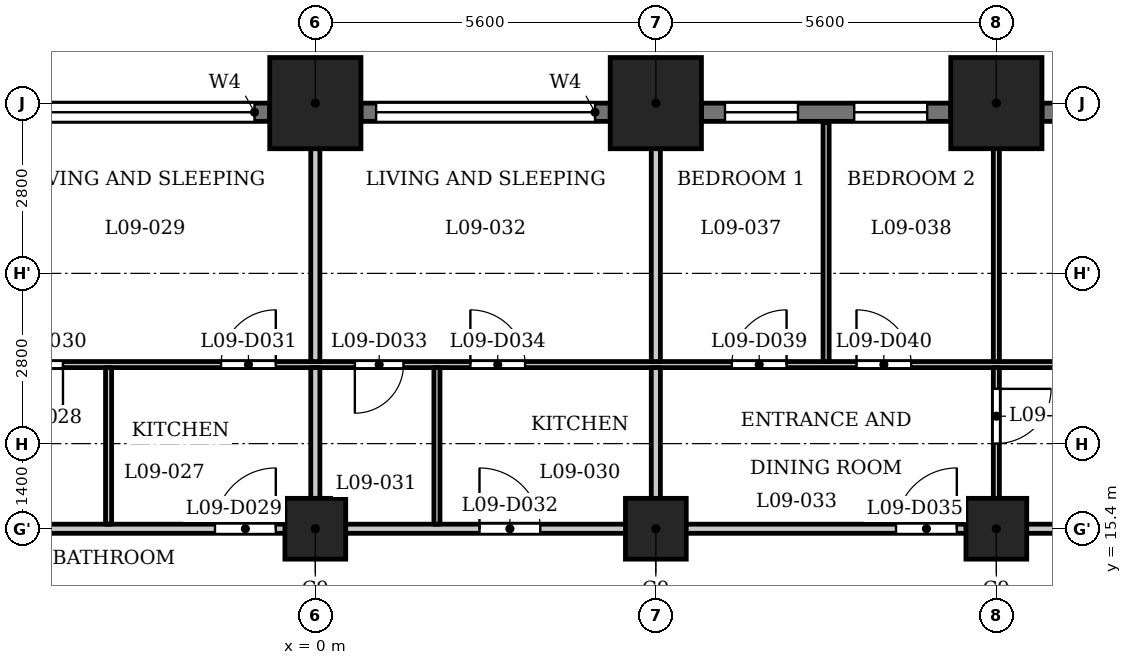
"""IFC4 building model, lengths in metres.
Left out: names, types, materials, properties, quantities, classifications, styles, units other than length and angle.
Written with IfcOpenShell. Run it as: python <this file> out.ifc"""

import sys

from ifc_helpers import new_model, si_unit, direction, frame, frame_2d, origin, origin_2d, place, context, subcontext, project, spatial, rectangle, extrude, element, fill, save


model = new_model("IFC4")
c1 = context("Model", 3, precision=1e-05, world=origin(), true_north=direction((0.0, 1.0)))
c2 = subcontext(c1, "Body", "Model", "MODEL_VIEW")
j1 = project(units=[si_unit("LENGTHUNIT", "METRE"), si_unit("PLANEANGLEUNIT", "RADIAN")], contexts=[c1])
p1 = place(None, origin())
s1 = spatial("IfcSite", under=j1, at=p1, CompositionType="ELEMENT")
p2 = place(p1, origin())
s2 = spatial("IfcBuilding", under=s1, at=p2, CompositionType="ELEMENT")
p3 = place(p2, frame((0.0, 0.0, 41.0)))
s3 = spatial("IfcBuildingStorey", under=s2, at=p3, CompositionType="ELEMENT", Elevation=41.0)
for number, where, z_axis, x_axis in (
    (1, (11.2, 22.4, 0.0), (0.0, 0.0, 1.0), (1.0, 0.0, 0.0)),
    (2, (5.6, 22.4, 0.0), (0.0, 0.0, 1.0), (1.0, 0.0, 0.0)),
    (3, (0.0, 22.4, 0.0), (0.0, 0.0, 1.0), (1.0, 0.0, 0.0)),
):
    element("IfcColumn", number, at=place(p3, frame(where, z_axis=z_axis, x_axis=x_axis)), inside=s3, PredefinedType="COLUMN", context=c2, shape_type="SweptSolid", body=[
        extrude(rectangle(XDim=1.5, YDim=1.5, at=origin_2d()), origin(), (0.0, 0.0, 1.0), 3.5),
    ])
for number, where, z_axis, x_axis in (
    (4, (0.0, 15.4, 0.0), (0.0, 0.0, 1.0), (1.0, 0.0, 0.0)),
    (5, (5.6, 15.4, 0.0), (0.0, 0.0, 1.0), (1.0, 0.0, 0.0)),
    (6, (11.2, 15.4, 0.0), (0.0, 0.0, 1.0), (1.0, 0.0, 0.0)),
):
    element("IfcColumn", number, at=place(p3, frame(where, z_axis=z_axis, x_axis=x_axis)), inside=s3, PredefinedType="COLUMN", context=c2, shape_type="SweptSolid", body=[
        extrude(rectangle(XDim=1.0, YDim=1.0, at=origin_2d()), origin(), (0.0, 0.0, 1.0), 3.5),
    ])
p4 = place(p3, frame((16.05, 22.25, 0.0), z_axis=(0.0, 0.0, 1.0), x_axis=(-1.0, 0.0, 0.0)))
e7 = element("IfcWall", 7, at=p4, inside=s3, PredefinedType="SOLIDWALL", context=c2, shape_type="SweptSolid", body=[
    extrude(rectangle(XDim=4.1, YDim=0.3, at=frame_2d((2.05, 0.0))), origin(), (0.0, 0.0, 1.0), 2.35),
])
p5 = place(p4, frame((0.25, 0.0, 1.2)))
e8 = element("IfcOpeningElement", 8, at=p5, cuts=e7, PredefinedType="OPENING", context=c2, shape_type="SweptSolid", body=[
    extrude(rectangle(XDim=3.6, YDim=0.95, at=frame_2d((1.8, 0.475))), frame((0.0, 0.16, 0.0), z_axis=(0.0, -1.0, 0.0), x_axis=(1.0, 0.0, 0.0)), (0.0, 0.0, 1.0), 0.32),
])
p6 = place(p3, frame((10.45, 22.25, 0.0), z_axis=(0.0, 0.0, 1.0), x_axis=(-1.0, 0.0, 0.0)))
e9 = element("IfcWall", 9, at=p6, inside=s3, PredefinedType="SOLIDWALL", context=c2, shape_type="SweptSolid", body=[
    extrude(rectangle(XDim=4.1, YDim=0.3, at=frame_2d((2.05, 0.0))), origin(), (0.0, 0.0, 1.0), 2.35),
])
p7 = place(p6, frame((0.387, 0.0, 0.6)))
e10 = element("IfcOpeningElement", 10, at=p7, cuts=e9, PredefinedType="OPENING", context=c2, shape_type="SweptSolid", body=[
    extrude(rectangle(XDim=1.2, YDim=1.55, at=frame_2d((0.6, 0.775))), frame((0.0, 0.16, 0.0), z_axis=(0.0, -1.0, 0.0), x_axis=(1.0, 0.0, 0.0)), (0.0, 0.0, 1.0), 0.32),
])
p8 = place(p6, frame((2.512, 0.0, 0.6)))
e11 = element("IfcOpeningElement", 11, at=p8, cuts=e9, PredefinedType="OPENING", context=c2, shape_type="SweptSolid", body=[
    extrude(rectangle(XDim=1.2, YDim=1.55, at=frame_2d((0.6, 0.775))), frame((0.0, 0.16, 0.0), z_axis=(0.0, -1.0, 0.0), x_axis=(1.0, 0.0, 0.0)), (0.0, 0.0, 1.0), 0.32),
])
p9 = place(p3, frame((4.85, 22.25, 0.0), z_axis=(0.0, 0.0, 1.0), x_axis=(-1.0, 0.0, 0.0)))
e12 = element("IfcWall", 12, at=p9, inside=s3, PredefinedType="SOLIDWALL", context=c2, shape_type="SweptSolid", body=[
    extrude(rectangle(XDim=4.1, YDim=0.3, at=frame_2d((2.05, 0.0))), origin(), (0.0, 0.0, 1.0), 2.35),
])
p10 = place(p9, frame((0.25, 0.0, 1.2)))
e13 = element("IfcOpeningElement", 13, at=p10, cuts=e12, PredefinedType="OPENING", context=c2, shape_type="SweptSolid", body=[
    extrude(rectangle(XDim=3.6, YDim=0.95, at=frame_2d((1.8, 0.475))), frame((0.0, 0.16, 0.0), z_axis=(0.0, -1.0, 0.0), x_axis=(1.0, 0.0, 0.0)), (0.0, 0.0, 1.0), 0.32),
])
p11 = place(p3, frame((-0.75, 22.25, 0.0), z_axis=(0.0, 0.0, 1.0), x_axis=(-1.0, 0.0, 0.0)))
e14 = element("IfcWall", 14, at=p11, inside=s3, PredefinedType="SOLIDWALL", context=c2, shape_type="SweptSolid", body=[
    extrude(rectangle(XDim=4.1, YDim=0.3, at=frame_2d((2.05, 0.0))), origin(), (0.0, 0.0, 1.0), 2.35),
])
p12 = place(p11, frame((0.25, 0.0, 1.2)))
e15 = element("IfcOpeningElement", 15, at=p12, cuts=e14, PredefinedType="OPENING", context=c2, shape_type="SweptSolid", body=[
    extrude(rectangle(XDim=3.6, YDim=0.95, at=frame_2d((1.8, 0.475))), frame((0.0, 0.16, 0.0), z_axis=(0.0, -1.0, 0.0), x_axis=(1.0, 0.0, 0.0)), (0.0, 0.0, 1.0), 0.32),
])
p13 = place(p3, frame((-27.484, 15.4, 0.0), z_axis=(0.0, 0.0, 1.0), x_axis=(1.0, 0.0, 0.0)))
e16 = element("IfcWall", 16, at=p13, inside=s3, PredefinedType="PARTITIONING", context=c2, shape_type="SweptSolid", body=[
    extrude(rectangle(XDim=54.968, YDim=0.15, at=frame_2d((27.484, 0.0))), origin(), (0.0, 0.0, 1.0), 3.2),
])
p14 = place(p13, frame((8.784, 0.0, 0.0)))
e17 = element("IfcOpeningElement", 17, at=p14, cuts=e16, PredefinedType="OPENING", context=c2, shape_type="SweptSolid", body=[
    extrude(rectangle(XDim=1.0, YDim=2.1, at=frame_2d((0.5, 1.05))), frame((0.0, 0.085, 0.0), z_axis=(0.0, -1.0, 0.0), x_axis=(1.0, 0.0, 0.0)), (0.0, 0.0, 1.0), 0.17),
])
p15 = place(p13, frame((14.634, 0.0, 0.0)))
e18 = element("IfcOpeningElement", 18, at=p15, cuts=e16, PredefinedType="OPENING", context=c2, shape_type="SweptSolid", body=[
    extrude(rectangle(XDim=1.0, YDim=2.1, at=frame_2d((0.5, 1.05))), frame((0.0, 0.085, 0.0), z_axis=(0.0, -1.0, 0.0), x_axis=(1.0, 0.0, 0.0)), (0.0, 0.0, 1.0), 0.17),
])
p16 = place(p13, frame((25.834, 0.0, 0.0)))
e19 = element("IfcOpeningElement", 19, at=p16, cuts=e16, PredefinedType="OPENING", context=c2, shape_type="SweptSolid", body=[
    extrude(rectangle(XDim=1.0, YDim=2.1, at=frame_2d((0.5, 1.05))), frame((0.0, 0.085, 0.0), z_axis=(0.0, -1.0, 0.0), x_axis=(1.0, 0.0, 0.0)), (0.0, 0.0, 1.0), 0.17),
])
p17 = place(p13, frame((30.184, 0.0, 0.0)))
e20 = element("IfcOpeningElement", 20, at=p17, cuts=e16, PredefinedType="OPENING", context=c2, shape_type="SweptSolid", body=[
    extrude(rectangle(XDim=1.0, YDim=2.1, at=frame_2d((0.5, 1.05))), frame((0.0, 0.085, 0.0), z_axis=(0.0, -1.0, 0.0), x_axis=(1.0, 0.0, 0.0)), (0.0, 0.0, 1.0), 0.17),
])
p18 = place(p13, frame((37.034, 0.0, 0.0)))
e21 = element("IfcOpeningElement", 21, at=p18, cuts=e16, PredefinedType="OPENING", context=c2, shape_type="SweptSolid", body=[
    extrude(rectangle(XDim=1.0, YDim=2.1, at=frame_2d((0.5, 1.05))), frame((0.0, 0.085, 0.0), z_axis=(0.0, -1.0, 0.0), x_axis=(1.0, 0.0, 0.0)), (0.0, 0.0, 1.0), 0.17),
])
p19 = place(p13, frame((48.234, 0.0, 0.0)))
e22 = element("IfcOpeningElement", 22, at=p19, cuts=e16, PredefinedType="OPENING", context=c2, shape_type="SweptSolid", body=[
    extrude(rectangle(XDim=1.0, YDim=2.1, at=frame_2d((0.5, 1.05))), frame((0.0, 0.085, 0.0), z_axis=(0.0, -1.0, 0.0), x_axis=(1.0, 0.0, 0.0)), (0.0, 0.0, 1.0), 0.17),
])
p20 = place(p3, frame((-26.44, 18.1, 0.0), z_axis=(0.0, 0.0, 1.0), x_axis=(1.0, 0.0, 0.0)))
e23 = element("IfcWall", 23, at=p20, inside=s3, PredefinedType="PARTITIONING", context=c2, shape_type="SweptSolid", body=[
    extrude(rectangle(XDim=52.63, YDim=0.1, at=frame_2d((26.315, 0.0))), origin(), (0.0, 0.0, 1.0), 3.2),
])
p21 = place(p20, frame((2.626, 0.0, 0.0)))
e24 = element("IfcOpeningElement", 24, at=p21, cuts=e23, PredefinedType="OPENING", context=c2, shape_type="SweptSolid", body=[
    extrude(rectangle(XDim=0.8, YDim=2.1, at=frame_2d((0.4, 1.05))), frame((0.0, 0.06, 0.0), z_axis=(0.0, -1.0, 0.0), x_axis=(1.0, 0.0, 0.0)), (0.0, 0.0, 1.0), 0.12),
])
p22 = place(p20, frame((7.84, 0.0, 0.0)))
e25 = element("IfcOpeningElement", 25, at=p22, cuts=e23, PredefinedType="OPENING", context=c2, shape_type="SweptSolid", body=[
    extrude(rectangle(XDim=0.9, YDim=2.1, at=frame_2d((0.45, 1.05))), frame((0.0, 0.06, 0.0), z_axis=(0.0, -1.0, 0.0), x_axis=(1.0, 0.0, 0.0)), (0.0, 0.0, 1.0), 0.12),
])
p23 = place(p20, frame((18.49, 0.0, 0.0)))
e26 = element("IfcOpeningElement", 26, at=p23, cuts=e23, PredefinedType="OPENING", context=c2, shape_type="SweptSolid", body=[
    extrude(rectangle(XDim=0.8, YDim=2.1, at=frame_2d((0.4, 1.05))), frame((0.0, 0.06, 0.0), z_axis=(0.0, -1.0, 0.0), x_axis=(1.0, 0.0, 0.0)), (0.0, 0.0, 1.0), 0.12),
])
p24 = place(p20, frame((16.54, 0.0, 0.0)))
e27 = element("IfcOpeningElement", 27, at=p24, cuts=e23, PredefinedType="OPENING", context=c2, shape_type="SweptSolid", body=[
    extrude(rectangle(XDim=0.9, YDim=2.1, at=frame_2d((0.45, 1.05))), frame((0.0, 0.06, 0.0), z_axis=(0.0, -1.0, 0.0), x_axis=(1.0, 0.0, 0.0)), (0.0, 0.0, 1.0), 0.12),
])
p25 = place(p20, frame((10.89, 0.0, 0.0)))
e28 = element("IfcOpeningElement", 28, at=p25, cuts=e23, PredefinedType="OPENING", context=c2, shape_type="SweptSolid", body=[
    extrude(rectangle(XDim=0.9, YDim=2.1, at=frame_2d((0.45, 1.05))), frame((0.0, 0.06, 0.0), z_axis=(0.0, -1.0, 0.0), x_axis=(1.0, 0.0, 0.0)), (0.0, 0.0, 1.0), 0.12),
])
p26 = place(p20, frame((12.94, 0.0, 0.0)))
e29 = element("IfcOpeningElement", 29, at=p26, cuts=e23, PredefinedType="OPENING", context=c2, shape_type="SweptSolid", body=[
    extrude(rectangle(XDim=0.9, YDim=2.1, at=frame_2d((0.45, 1.05))), frame((0.0, 0.06, 0.0), z_axis=(0.0, -1.0, 0.0), x_axis=(1.0, 0.0, 0.0)), (0.0, 0.0, 1.0), 0.12),
])
p27 = place(p20, frame((21.49, 0.0, 0.0)))
e30 = element("IfcOpeningElement", 30, at=p27, cuts=e23, PredefinedType="OPENING", context=c2, shape_type="SweptSolid", body=[
    extrude(rectangle(XDim=0.8, YDim=2.1, at=frame_2d((0.4, 1.05))), frame((0.0, 0.06, 0.0), z_axis=(0.0, -1.0, 0.0), x_axis=(1.0, 0.0, 0.0)), (0.0, 0.0, 1.0), 0.12),
])
p28 = place(p20, frame((24.89, 0.0, 0.0)))
e31 = element("IfcOpeningElement", 31, at=p28, cuts=e23, PredefinedType="OPENING", context=c2, shape_type="SweptSolid", body=[
    extrude(rectangle(XDim=0.9, YDim=2.1, at=frame_2d((0.45, 1.05))), frame((0.0, 0.06, 0.0), z_axis=(0.0, -1.0, 0.0), x_axis=(1.0, 0.0, 0.0)), (0.0, 0.0, 1.0), 0.12),
])
p29 = place(p20, frame((27.09, 0.0, 0.0)))
e32 = element("IfcOpeningElement", 32, at=p29, cuts=e23, PredefinedType="OPENING", context=c2, shape_type="SweptSolid", body=[
    extrude(rectangle(XDim=0.8, YDim=2.1, at=frame_2d((0.4, 1.05))), frame((0.0, 0.06, 0.0), z_axis=(0.0, -1.0, 0.0), x_axis=(1.0, 0.0, 0.0)), (0.0, 0.0, 1.0), 0.12),
])
p30 = place(p20, frame((28.99, 0.0, 0.0)))
e33 = element("IfcOpeningElement", 33, at=p30, cuts=e23, PredefinedType="OPENING", context=c2, shape_type="SweptSolid", body=[
    extrude(rectangle(XDim=0.9, YDim=2.1, at=frame_2d((0.45, 1.05))), frame((0.0, 0.06, 0.0), z_axis=(0.0, -1.0, 0.0), x_axis=(1.0, 0.0, 0.0)), (0.0, 0.0, 1.0), 0.12),
])
p31 = place(p20, frame((41.69, 0.0, 0.0)))
e34 = element("IfcOpeningElement", 34, at=p31, cuts=e23, PredefinedType="OPENING", context=c2, shape_type="SweptSolid", body=[
    extrude(rectangle(XDim=0.8, YDim=2.1, at=frame_2d((0.4, 1.05))), frame((0.0, 0.06, 0.0), z_axis=(0.0, -1.0, 0.0), x_axis=(1.0, 0.0, 0.0)), (0.0, 0.0, 1.0), 0.12),
])
p32 = place(p20, frame((38.99, 0.0, 0.0)))
e35 = element("IfcOpeningElement", 35, at=p32, cuts=e23, PredefinedType="OPENING", context=c2, shape_type="SweptSolid", body=[
    extrude(rectangle(XDim=0.9, YDim=2.1, at=frame_2d((0.45, 1.05))), frame((0.0, 0.06, 0.0), z_axis=(0.0, -1.0, 0.0), x_axis=(1.0, 0.0, 0.0)), (0.0, 0.0, 1.0), 0.12),
])
p33 = place(p20, frame((33.29, 0.0, 0.0)))
e36 = element("IfcOpeningElement", 36, at=p33, cuts=e23, PredefinedType="OPENING", context=c2, shape_type="SweptSolid", body=[
    extrude(rectangle(XDim=0.9, YDim=2.1, at=frame_2d((0.45, 1.05))), frame((0.0, 0.06, 0.0), z_axis=(0.0, -1.0, 0.0), x_axis=(1.0, 0.0, 0.0)), (0.0, 0.0, 1.0), 0.12),
])
p34 = place(p20, frame((35.34, 0.0, 0.0)))
e37 = element("IfcOpeningElement", 37, at=p34, cuts=e23, PredefinedType="OPENING", context=c2, shape_type="SweptSolid", body=[
    extrude(rectangle(XDim=0.9, YDim=2.1, at=frame_2d((0.45, 1.05))), frame((0.0, 0.06, 0.0), z_axis=(0.0, -1.0, 0.0), x_axis=(1.0, 0.0, 0.0)), (0.0, 0.0, 1.0), 0.12),
])
p35 = place(p20, frame((50.74, 0.0, 0.0)))
e38 = element("IfcOpeningElement", 38, at=p35, cuts=e23, PredefinedType="OPENING", context=c2, shape_type="SweptSolid", body=[
    extrude(rectangle(XDim=0.8, YDim=2.1, at=frame_2d((0.4, 1.05))), frame((0.0, 0.06, 0.0), z_axis=(0.0, -1.0, 0.0), x_axis=(1.0, 0.0, 0.0)), (0.0, 0.0, 1.0), 0.12),
])
p36 = place(p20, frame((47.29, 0.0, 0.0)))
e39 = element("IfcOpeningElement", 39, at=p36, cuts=e23, PredefinedType="OPENING", context=c2, shape_type="SweptSolid", body=[
    extrude(rectangle(XDim=0.9, YDim=2.1, at=frame_2d((0.45, 1.05))), frame((0.0, 0.06, 0.0), z_axis=(0.0, -1.0, 0.0), x_axis=(1.0, 0.0, 0.0)), (0.0, 0.0, 1.0), 0.12),
])
p37 = place(p3, frame((-3.4, 15.475, 0.0), z_axis=(0.0, 0.0, 1.0), x_axis=(0.0, 1.0, 0.0)))
e40 = element("IfcWall", 40, at=p37, inside=s3, PredefinedType="PARTITIONING", context=c2, shape_type="SweptSolid", body=[
    extrude(rectangle(XDim=2.575, YDim=0.1, at=frame_2d((1.288, 0.0))), origin(), (0.0, 0.0, 1.0), 3.2),
])
p38 = place(p3, frame((0.0, 15.475, 0.0), z_axis=(0.0, 0.0, 1.0), x_axis=(0.0, 1.0, 0.0)))
e41 = element("IfcWall", 41, at=p38, inside=s3, PredefinedType="PARTITIONING", context=c2, shape_type="SweptSolid", body=[
    extrude(rectangle(XDim=2.575, YDim=0.15, at=frame_2d((1.288, 0.0))), origin(), (0.0, 0.0, 1.0), 3.2),
])
p39 = place(p3, frame((0.0, 18.15, 0.0), z_axis=(0.0, 0.0, 1.0), x_axis=(0.0, 1.0, 0.0)))
e42 = element("IfcWall", 42, at=p39, inside=s3, PredefinedType="PARTITIONING", context=c2, shape_type="SweptSolid", body=[
    extrude(rectangle(XDim=4.98, YDim=0.15, at=frame_2d((2.49, 0.0))), origin(), (0.0, 0.0, 1.0), 3.2),
])
p40 = place(p3, frame((2.0, 15.475, 0.0), z_axis=(0.0, 0.0, 1.0), x_axis=(0.0, 1.0, 0.0)))
e43 = element("IfcWall", 43, at=p40, inside=s3, PredefinedType="PARTITIONING", context=c2, shape_type="SweptSolid", body=[
    extrude(rectangle(XDim=2.575, YDim=0.1, at=frame_2d((1.288, 0.0))), origin(), (0.0, 0.0, 1.0), 3.2),
])
p41 = place(p3, frame((5.6, 15.475, 0.0), z_axis=(0.0, 0.0, 1.0), x_axis=(0.0, 1.0, 0.0)))
e44 = element("IfcWall", 44, at=p41, inside=s3, PredefinedType="PARTITIONING", context=c2, shape_type="SweptSolid", body=[
    extrude(rectangle(XDim=2.575, YDim=0.15, at=frame_2d((1.288, 0.0))), origin(), (0.0, 0.0, 1.0), 3.2),
])
p42 = place(p3, frame((5.6, 18.15, 0.0), z_axis=(0.0, 0.0, 1.0), x_axis=(0.0, 1.0, 0.0)))
e45 = element("IfcWall", 45, at=p42, inside=s3, PredefinedType="PARTITIONING", context=c2, shape_type="SweptSolid", body=[
    extrude(rectangle(XDim=4.98, YDim=0.15, at=frame_2d((2.49, 0.0))), origin(), (0.0, 0.0, 1.0), 3.2),
])
p43 = place(p3, frame((8.4, 18.15, 0.0), z_axis=(0.0, 0.0, 1.0), x_axis=(0.0, 1.0, 0.0)))
e46 = element("IfcWall", 46, at=p43, inside=s3, PredefinedType="PARTITIONING", context=c2, shape_type="SweptSolid", body=[
    extrude(rectangle(XDim=3.93, YDim=0.1, at=frame_2d((1.965, 0.0))), origin(), (0.0, 0.0, 1.0), 3.2),
])
p44 = place(p3, frame((11.2, 15.475, 0.0), z_axis=(0.0, 0.0, 1.0), x_axis=(0.0, 1.0, 0.0)))
e47 = element("IfcWall", 47, at=p44, inside=s3, PredefinedType="PARTITIONING", context=c2, shape_type="SweptSolid", body=[
    extrude(rectangle(XDim=2.575, YDim=0.1, at=frame_2d((1.288, 0.0))), origin(), (0.0, 0.0, 1.0), 3.2),
])
p45 = place(p44, frame((1.326, 0.0, 0.0)))
e48 = element("IfcOpeningElement", 48, at=p45, cuts=e47, PredefinedType="OPENING", context=c2, shape_type="SweptSolid", body=[
    extrude(rectangle(XDim=0.9, YDim=2.1, at=frame_2d((0.45, 1.05))), frame((0.0, 0.06, 0.0), z_axis=(0.0, -1.0, 0.0), x_axis=(1.0, 0.0, 0.0)), (0.0, 0.0, 1.0), 0.12),
])
p46 = place(p3, frame((11.2, 18.15, 0.0), z_axis=(0.0, 0.0, 1.0), x_axis=(0.0, 1.0, 0.0)))
e49 = element("IfcWall", 49, at=p46, inside=s3, PredefinedType="PARTITIONING", context=c2, shape_type="SweptSolid", body=[
    extrude(rectangle(XDim=4.98, YDim=0.1, at=frame_2d((2.49, 0.0))), origin(), (0.0, 0.0, 1.0), 3.2),
])
p47 = place(p16, origin())
e50 = element("IfcDoor", 50, at=p47, inside=s3, OperationType="SINGLE_SWING_LEFT", PredefinedType="DOOR", context=c2, shape_type="SweptSolid", body=[
    extrude(rectangle(XDim=1.0, YDim=2.1, at=frame_2d((0.5, 1.05))), frame((0.0, 0.025, 0.0), z_axis=(0.0, -1.0, 0.0), x_axis=(1.0, 0.0, 0.0)), (0.0, 0.0, 1.0), 0.05),
])
fill(e19, e50)
p48 = place(p27, origin())
e51 = element("IfcDoor", 51, at=p48, inside=s3, OperationType="SINGLE_SWING_RIGHT", PredefinedType="DOOR", context=c2, shape_type="SweptSolid", body=[
    extrude(rectangle(XDim=0.8, YDim=2.1, at=frame_2d((0.4, 1.05))), frame((0.0, 0.025, 0.0), z_axis=(0.0, -1.0, 0.0), x_axis=(1.0, 0.0, 0.0)), (0.0, 0.0, 1.0), 0.05),
])
fill(e30, e51)
p49 = place(p28, origin())
e52 = element("IfcDoor", 52, at=p49, inside=s3, OperationType="SINGLE_SWING_LEFT", PredefinedType="DOOR", context=c2, shape_type="SweptSolid", body=[
    extrude(rectangle(XDim=0.9, YDim=2.1, at=frame_2d((0.45, 1.05))), frame((0.0, 0.025, 0.0), z_axis=(0.0, -1.0, 0.0), x_axis=(1.0, 0.0, 0.0)), (0.0, 0.0, 1.0), 0.05),
])
fill(e31, e52)
p50 = place(p17, origin())
e53 = element("IfcDoor", 53, at=p50, inside=s3, OperationType="SINGLE_SWING_RIGHT", PredefinedType="DOOR", context=c2, shape_type="SweptSolid", body=[
    extrude(rectangle(XDim=1.0, YDim=2.1, at=frame_2d((0.5, 1.05))), frame((0.0, 0.025, 0.0), z_axis=(0.0, -1.0, 0.0), x_axis=(1.0, 0.0, 0.0)), (0.0, 0.0, 1.0), 0.05),
])
fill(e20, e53)
p51 = place(p29, origin())
e54 = element("IfcDoor", 54, at=p51, inside=s3, OperationType="SINGLE_SWING_LEFT", PredefinedType="DOOR", context=c2, shape_type="SweptSolid", body=[
    extrude(rectangle(XDim=0.8, YDim=2.1, at=frame_2d((0.4, 1.05))), frame((0.0, 0.025, 0.0), z_axis=(0.0, -1.0, 0.0), x_axis=(1.0, 0.0, 0.0)), (0.0, 0.0, 1.0), 0.05),
])
fill(e32, e54)
p52 = place(p30, origin())
e55 = element("IfcDoor", 55, at=p52, inside=s3, OperationType="SINGLE_SWING_RIGHT", PredefinedType="DOOR", context=c2, shape_type="SweptSolid", body=[
    extrude(rectangle(XDim=0.9, YDim=2.1, at=frame_2d((0.45, 1.05))), frame((0.0, 0.025, 0.0), z_axis=(0.0, -1.0, 0.0), x_axis=(1.0, 0.0, 0.0)), (0.0, 0.0, 1.0), 0.05),
])
fill(e33, e55)
p53 = place(p18, origin())
e56 = element("IfcDoor", 56, at=p53, inside=s3, OperationType="SINGLE_SWING_LEFT", PredefinedType="DOOR", context=c2, shape_type="SweptSolid", body=[
    extrude(rectangle(XDim=1.0, YDim=2.1, at=frame_2d((0.5, 1.05))), frame((0.0, 0.025, 0.0), z_axis=(0.0, -1.0, 0.0), x_axis=(1.0, 0.0, 0.0)), (0.0, 0.0, 1.0), 0.05),
])
fill(e21, e56)
p54 = place(p45, origin())
e57 = element("IfcDoor", 57, at=p54, inside=s3, OperationType="SINGLE_SWING_RIGHT", PredefinedType="DOOR", context=c2, shape_type="SweptSolid", body=[
    extrude(rectangle(XDim=0.9, YDim=2.1, at=frame_2d((0.45, 1.05))), frame((0.0, 0.025, 0.0), z_axis=(0.0, -1.0, 0.0), x_axis=(1.0, 0.0, 0.0)), (0.0, 0.0, 1.0), 0.05),
])
fill(e48, e57)
p55 = place(p33, origin())
e58 = element("IfcDoor", 58, at=p55, inside=s3, OperationType="SINGLE_SWING_LEFT", PredefinedType="DOOR", context=c2, shape_type="SweptSolid", body=[
    extrude(rectangle(XDim=0.9, YDim=2.1, at=frame_2d((0.45, 1.05))), frame((0.0, 0.025, 0.0), z_axis=(0.0, -1.0, 0.0), x_axis=(1.0, 0.0, 0.0)), (0.0, 0.0, 1.0), 0.05),
])
fill(e36, e58)
p56 = place(p34, origin())
e59 = element("IfcDoor", 59, at=p56, inside=s3, OperationType="SINGLE_SWING_RIGHT", PredefinedType="DOOR", context=c2, shape_type="SweptSolid", body=[
    extrude(rectangle(XDim=0.9, YDim=2.1, at=frame_2d((0.45, 1.05))), frame((0.0, 0.025, 0.0), z_axis=(0.0, -1.0, 0.0), x_axis=(1.0, 0.0, 0.0)), (0.0, 0.0, 1.0), 0.05),
])
fill(e37, e59)
p57 = place(p7, origin())
e60 = element("IfcWindow", 60, at=p57, inside=s3, PartitioningType="SINGLE_PANEL", PredefinedType="WINDOW", context=c2, shape_type="SweptSolid", body=[
    extrude(rectangle(XDim=1.2, YDim=1.55, at=frame_2d((0.6, 0.775))), frame((0.0, 0.03, 0.0), z_axis=(0.0, -1.0, 0.0), x_axis=(1.0, 0.0, 0.0)), (0.0, 0.0, 1.0), 0.06),
])
fill(e10, e60)
p58 = place(p8, origin())
e61 = element("IfcWindow", 61, at=p58, inside=s3, PartitioningType="SINGLE_PANEL", PredefinedType="WINDOW", context=c2, shape_type="SweptSolid", body=[
    extrude(rectangle(XDim=1.2, YDim=1.55, at=frame_2d((0.6, 0.775))), frame((0.0, 0.03, 0.0), z_axis=(0.0, -1.0, 0.0), x_axis=(1.0, 0.0, 0.0)), (0.0, 0.0, 1.0), 0.06),
])
fill(e11, e61)
p59 = place(p10, origin())
e62 = element("IfcWindow", 62, at=p59, inside=s3, PartitioningType="SINGLE_PANEL", PredefinedType="WINDOW", context=c2, shape_type="SweptSolid", body=[
    extrude(rectangle(XDim=3.6, YDim=0.95, at=frame_2d((1.8, 0.475))), frame((0.0, 0.03, 0.0), z_axis=(0.0, -1.0, 0.0), x_axis=(1.0, 0.0, 0.0)), (0.0, 0.0, 1.0), 0.06),
])
fill(e13, e62)
p60 = place(p12, origin())
e63 = element("IfcWindow", 63, at=p60, inside=s3, PartitioningType="SINGLE_PANEL", PredefinedType="WINDOW", context=c2, shape_type="SweptSolid", body=[
    extrude(rectangle(XDim=3.6, YDim=0.95, at=frame_2d((1.8, 0.475))), frame((0.0, 0.03, 0.0), z_axis=(0.0, -1.0, 0.0), x_axis=(1.0, 0.0, 0.0)), (0.0, 0.0, 1.0), 0.06),
])
fill(e15, e63)
save(model, sys.argv[1])
